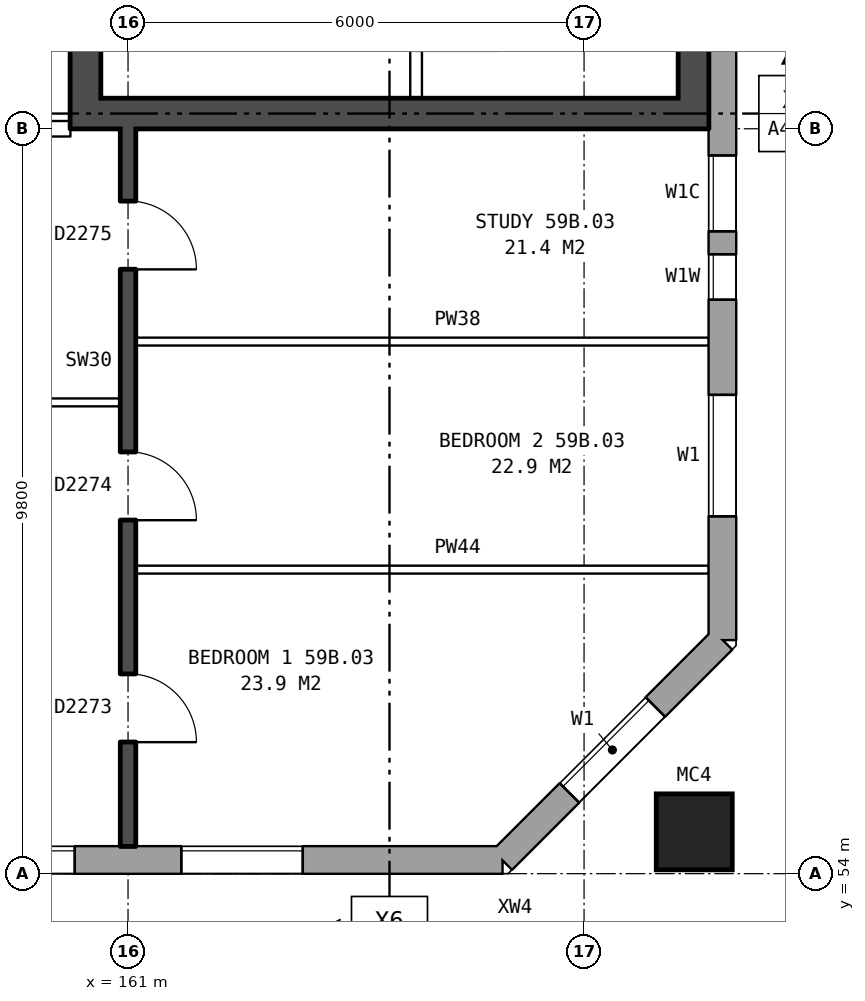
"""IFC4 building model, lengths in metres.
Left out: names, types, materials, properties, quantities, classifications, styles, units other than length and angle.
Written with IfcOpenShell. Run it as: python <this file> out.ifc"""

import sys

from ifc_helpers import new_model, si_unit, direction, frame, frame_2d, origin, origin_2d, place, context, subcontext, project, spatial, rectangle, hollow_rectangle, extrude, element, fill, save


model = new_model("IFC4")
c1 = context("Model", 3, precision=1e-05, world=origin(), true_north=direction((0.0, 1.0)))
c2 = subcontext(c1, "Body", "Model", "MODEL_VIEW")
j1 = project(units=[si_unit("LENGTHUNIT", "METRE"), si_unit("PLANEANGLEUNIT", "RADIAN")], contexts=[c1])
p1 = place(None, origin())
s1 = spatial("IfcSite", under=j1, at=p1, CompositionType="ELEMENT")
p2 = place(p1, origin())
s2 = spatial("IfcBuilding", under=s1, at=p2, CompositionType="ELEMENT")
p3 = place(p2, frame((0.0, 0.0, 209.0)))
s3 = spatial("IfcBuildingStorey", under=s2, at=p3, CompositionType="ELEMENT", Elevation=209.0)
p4 = place(p3, frame((168.45, 54.55, 0.0), z_axis=(0.0, 0.0, 1.0), x_axis=(1.0, 0.0, 0.0)))
e1 = element("IfcColumn", 1, at=p4, inside=s3, PredefinedType="COLUMN", context=c2, shape_type="SweptSolid", body=[
    extrude(hollow_rectangle(XDim=1.0, YDim=1.0, WallThickness=0.055, at=origin_2d()), origin(), (0.0, 0.0, 1.0), 3.1),
])
p5 = place(p3, frame((132.05, 54.18, 0.0), z_axis=(0.0, 0.0, 1.0), x_axis=(1.0, 0.0, 0.0)))
e2 = element("IfcWall", 2, at=p5, inside=s3, PredefinedType="STANDARD", context=c2, shape_type="SweptSolid", body=[
    extrude(rectangle(XDim=33.875, YDim=0.36, at=frame_2d((16.938, 0.0))), origin(), (0.0, 0.0, 1.0), 2.85),
])
p6 = place(p5, frame((0.3, 0.0, 0.8)))
e3 = element("IfcOpeningElement", 3, at=p6, cuts=e2, PredefinedType="OPENING", context=c2, shape_type="SweptSolid", body=[
    extrude(rectangle(XDim=1.4, YDim=1.8, at=frame_2d((0.7, 0.9))), frame((0.0, 0.19, 0.0), z_axis=(0.0, -1.0, 0.0), x_axis=(1.0, 0.0, 0.0)), (0.0, 0.0, 1.0), 0.38),
])
p7 = place(p5, frame((5.65, 0.0, 0.8)))
e4 = element("IfcOpeningElement", 4, at=p7, cuts=e2, PredefinedType="OPENING", context=c2, shape_type="SweptSolid", body=[
    extrude(rectangle(XDim=1.6, YDim=1.8, at=frame_2d((0.8, 0.9))), frame((0.0, 0.19, 0.0), z_axis=(0.0, -1.0, 0.0), x_axis=(1.0, 0.0, 0.0)), (0.0, 0.0, 1.0), 0.38),
])
p8 = place(p5, frame((8.65, 0.0, 0.8)))
e5 = element("IfcOpeningElement", 5, at=p8, cuts=e2, PredefinedType="OPENING", context=c2, shape_type="SweptSolid", body=[
    extrude(rectangle(XDim=1.6, YDim=1.8, at=frame_2d((0.8, 0.9))), frame((0.0, 0.19, 0.0), z_axis=(0.0, -1.0, 0.0), x_axis=(1.0, 0.0, 0.0)), (0.0, 0.0, 1.0), 0.38),
])
p9 = place(p5, frame((11.65, 0.0, 0.8)))
e6 = element("IfcOpeningElement", 6, at=p9, cuts=e2, PredefinedType="OPENING", context=c2, shape_type="SweptSolid", body=[
    extrude(rectangle(XDim=1.6, YDim=1.8, at=frame_2d((0.8, 0.9))), frame((0.0, 0.19, 0.0), z_axis=(0.0, -1.0, 0.0), x_axis=(1.0, 0.0, 0.0)), (0.0, 0.0, 1.0), 0.38),
])
p10 = place(p5, frame((14.65, 0.0, 0.8)))
e7 = element("IfcOpeningElement", 7, at=p10, cuts=e2, PredefinedType="OPENING", context=c2, shape_type="SweptSolid", body=[
    extrude(rectangle(XDim=1.6, YDim=1.8, at=frame_2d((0.8, 0.9))), frame((0.0, 0.19, 0.0), z_axis=(0.0, -1.0, 0.0), x_axis=(1.0, 0.0, 0.0)), (0.0, 0.0, 1.0), 0.38),
])
p11 = place(p5, frame((17.65, 0.0, 0.8)))
e8 = element("IfcOpeningElement", 8, at=p11, cuts=e2, PredefinedType="OPENING", context=c2, shape_type="SweptSolid", body=[
    extrude(rectangle(XDim=1.6, YDim=1.8, at=frame_2d((0.8, 0.9))), frame((0.0, 0.19, 0.0), z_axis=(0.0, -1.0, 0.0), x_axis=(1.0, 0.0, 0.0)), (0.0, 0.0, 1.0), 0.38),
])
p12 = place(p5, frame((20.65, 0.0, 0.8)))
e9 = element("IfcOpeningElement", 9, at=p12, cuts=e2, PredefinedType="OPENING", context=c2, shape_type="SweptSolid", body=[
    extrude(rectangle(XDim=1.6, YDim=1.8, at=frame_2d((0.8, 0.9))), frame((0.0, 0.19, 0.0), z_axis=(0.0, -1.0, 0.0), x_axis=(1.0, 0.0, 0.0)), (0.0, 0.0, 1.0), 0.38),
])
p13 = place(p5, frame((23.65, 0.0, 0.8)))
e10 = element("IfcOpeningElement", 10, at=p13, cuts=e2, PredefinedType="OPENING", context=c2, shape_type="SweptSolid", body=[
    extrude(rectangle(XDim=1.6, YDim=1.8, at=frame_2d((0.8, 0.9))), frame((0.0, 0.19, 0.0), z_axis=(0.0, -1.0, 0.0), x_axis=(1.0, 0.0, 0.0)), (0.0, 0.0, 1.0), 0.38),
])
p14 = place(p5, frame((26.65, 0.0, 0.8)))
e11 = element("IfcOpeningElement", 11, at=p14, cuts=e2, PredefinedType="OPENING", context=c2, shape_type="SweptSolid", body=[
    extrude(rectangle(XDim=1.6, YDim=1.8, at=frame_2d((0.8, 0.9))), frame((0.0, 0.19, 0.0), z_axis=(0.0, -1.0, 0.0), x_axis=(1.0, 0.0, 0.0)), (0.0, 0.0, 1.0), 0.38),
])
p15 = place(p5, frame((29.65, 0.0, 0.8)))
e12 = element("IfcOpeningElement", 12, at=p15, cuts=e2, PredefinedType="OPENING", context=c2, shape_type="SweptSolid", body=[
    extrude(rectangle(XDim=1.6, YDim=1.8, at=frame_2d((0.8, 0.9))), frame((0.0, 0.19, 0.0), z_axis=(0.0, -1.0, 0.0), x_axis=(1.0, 0.0, 0.0)), (0.0, 0.0, 1.0), 0.38),
])
p16 = place(p5, frame((2.0, 0.0, 0.9)))
e13 = element("IfcOpeningElement", 13, at=p16, cuts=e2, PredefinedType="OPENING", context=c2, shape_type="SweptSolid", body=[
    extrude(rectangle(XDim=0.8, YDim=1.5, at=frame_2d((0.4, 0.75))), frame((0.0, 0.19, 0.0), z_axis=(0.0, -1.0, 0.0), x_axis=(1.0, 0.0, 0.0)), (0.0, 0.0, 1.0), 0.38),
])
p17 = place(p3, frame((165.925, 54.18, 0.0), z_axis=(0.0, 0.0, 1.0), x_axis=(0.707106781187, 0.707106781187, 0.0)))
e14 = element("IfcWall", 14, at=p17, inside=s3, PredefinedType="STANDARD", context=c2, shape_type="SweptSolid", body=[
    extrude(rectangle(XDim=4.094, YDim=0.36, at=frame_2d((2.047, 0.0))), origin(), (0.0, 0.0, 1.0), 2.85),
])
p18 = place(p17, frame((1.247, 0.0, 0.8)))
e15 = element("IfcOpeningElement", 15, at=p18, cuts=e14, PredefinedType="OPENING", context=c2, shape_type="SweptSolid", body=[
    extrude(rectangle(XDim=1.6, YDim=1.8, at=frame_2d((0.8, 0.9))), frame((0.0, 0.19, 0.0), z_axis=(0.0, -1.0, 0.0), x_axis=(1.0, 0.0, 0.0)), (0.0, 0.0, 1.0), 0.38),
])
p19 = place(p3, frame((168.82, 57.075, 0.0), z_axis=(0.0, 0.0, 1.0), x_axis=(0.0, 1.0, 0.0)))
e16 = element("IfcWall", 16, at=p19, inside=s3, PredefinedType="STANDARD", context=c2, shape_type="SweptSolid", body=[
    extrude(rectangle(XDim=25.851, YDim=0.36, at=frame_2d((12.925, 0.0))), origin(), (0.0, 0.0, 1.0), 2.85),
])
p20 = place(p19, frame((1.625, 0.0, 0.8)))
e17 = element("IfcOpeningElement", 17, at=p20, cuts=e16, PredefinedType="OPENING", context=c2, shape_type="SweptSolid", body=[
    extrude(rectangle(XDim=1.6, YDim=1.8, at=frame_2d((0.8, 0.9))), frame((0.0, 0.19, 0.0), z_axis=(0.0, -1.0, 0.0), x_axis=(1.0, 0.0, 0.0)), (0.0, 0.0, 1.0), 0.38),
])
p21 = place(p19, frame((4.475, 0.0, 0.15)))
e18 = element("IfcOpeningElement", 18, at=p21, cuts=e16, PredefinedType="OPENING", context=c2, shape_type="SweptSolid", body=[
    extrude(rectangle(XDim=0.6, YDim=0.9, at=frame_2d((0.3, 0.45))), frame((0.0, 0.19, 0.0), z_axis=(0.0, -1.0, 0.0), x_axis=(1.0, 0.0, 0.0)), (0.0, 0.0, 1.0), 0.38),
])
p22 = place(p19, frame((19.425, 0.0, 0.25)))
e19 = element("IfcOpeningElement", 19, at=p22, cuts=e16, PredefinedType="OPENING", context=c2, shape_type="SweptSolid", body=[
    extrude(rectangle(XDim=1.0, YDim=1.8, at=frame_2d((0.5, 0.9))), frame((0.0, 0.19, 0.0), z_axis=(0.0, -1.0, 0.0), x_axis=(1.0, 0.0, 0.0)), (0.0, 0.0, 1.0), 0.38),
])
p23 = place(p19, frame((22.625, 0.0, 0.8)))
e20 = element("IfcOpeningElement", 20, at=p23, cuts=e16, PredefinedType="OPENING", context=c2, shape_type="SweptSolid", body=[
    extrude(rectangle(XDim=1.6, YDim=1.8, at=frame_2d((0.8, 0.9))), frame((0.0, 0.19, 0.0), z_axis=(0.0, -1.0, 0.0), x_axis=(1.0, 0.0, 0.0)), (0.0, 0.0, 1.0), 0.38),
])
p24 = place(p19, frame((5.375, 0.0, 0.15)))
e21 = element("IfcOpeningElement", 21, at=p24, cuts=e16, PredefinedType="OPENING", context=c2, shape_type="SweptSolid", body=[
    extrude(rectangle(XDim=1.0, YDim=1.8, at=frame_2d((0.5, 0.9))), frame((0.0, 0.19, 0.0), z_axis=(0.0, -1.0, 0.0), x_axis=(1.0, 0.0, 0.0)), (0.0, 0.0, 1.0), 0.38),
])
p25 = place(p19, frame((20.725, 0.0, 0.15)))
e22 = element("IfcOpeningElement", 22, at=p25, cuts=e16, PredefinedType="OPENING", context=c2, shape_type="SweptSolid", body=[
    extrude(rectangle(XDim=0.6, YDim=0.9, at=frame_2d((0.3, 0.45))), frame((0.0, 0.19, 0.0), z_axis=(0.0, -1.0, 0.0), x_axis=(1.0, 0.0, 0.0)), (0.0, 0.0, 1.0), 0.38),
])
p26 = place(p3, frame((160.44, 76.2, 0.0), z_axis=(0.0, 0.0, 1.0), x_axis=(0.0, -1.0, 0.0)))
e23 = element("IfcWall", 23, at=p26, inside=s3, PredefinedType="SHEAR", context=c2, shape_type="SweptSolid", body=[
    extrude(rectangle(XDim=12.4, YDim=0.4, at=frame_2d((6.2, 0.0))), origin(), (0.0, 0.0, 1.0), 2.85),
])
p27 = place(p26, frame((1.325, 0.0, 0.0)))
e24 = element("IfcOpeningElement", 24, at=p27, cuts=e23, PredefinedType="OPENING", context=c2, shape_type="SweptSolid", body=[
    extrude(rectangle(XDim=1.1, YDim=2.1, at=frame_2d((0.55, 1.05))), frame((0.0, 0.21, 0.0), z_axis=(0.0, -1.0, 0.0), x_axis=(1.0, 0.0, 0.0)), (0.0, 0.0, 1.0), 0.42),
])
p28 = place(p26, frame((3.825, 0.0, 0.0)))
e25 = element("IfcOpeningElement", 25, at=p28, cuts=e23, PredefinedType="OPENING", context=c2, shape_type="SweptSolid", body=[
    extrude(rectangle(XDim=0.85, YDim=2.1, at=frame_2d((0.425, 1.05))), frame((0.0, 0.21, 0.0), z_axis=(0.0, -1.0, 0.0), x_axis=(1.0, 0.0, 0.0)), (0.0, 0.0, 1.0), 0.42),
])
p29 = place(p26, frame((5.975, 0.0, 0.0)))
e26 = element("IfcOpeningElement", 26, at=p29, cuts=e23, PredefinedType="OPENING", context=c2, shape_type="SweptSolid", body=[
    extrude(rectangle(XDim=0.85, YDim=2.1, at=frame_2d((0.425, 1.05))), frame((0.0, 0.21, 0.0), z_axis=(0.0, -1.0, 0.0), x_axis=(1.0, 0.0, 0.0)), (0.0, 0.0, 1.0), 0.42),
])
p30 = place(p26, frame((9.9, 0.0, 0.0)))
e27 = element("IfcOpeningElement", 27, at=p30, cuts=e23, PredefinedType="OPENING", context=c2, shape_type="SweptSolid", body=[
    extrude(rectangle(XDim=1.1, YDim=2.1, at=frame_2d((0.55, 1.05))), frame((0.0, 0.21, 0.0), z_axis=(0.0, -1.0, 0.0), x_axis=(1.0, 0.0, 0.0)), (0.0, 0.0, 1.0), 0.42),
])
p31 = place(p26, frame((8.125, 0.0, 0.0)))
e28 = element("IfcOpeningElement", 28, at=p31, cuts=e23, PredefinedType="OPENING", context=c2, shape_type="SweptSolid", body=[
    extrude(rectangle(XDim=0.85, YDim=2.1, at=frame_2d((0.425, 1.05))), frame((0.0, 0.21, 0.0), z_axis=(0.0, -1.0, 0.0), x_axis=(1.0, 0.0, 0.0)), (0.0, 0.0, 1.0), 0.42),
])
p32 = place(p3, frame((168.44, 76.2, 0.0), z_axis=(0.0, 0.0, 1.0), x_axis=(0.0, -1.0, 0.0)))
e29 = element("IfcWall", 29, at=p32, inside=s3, PredefinedType="SHEAR", context=c2, shape_type="SweptSolid", body=[
    extrude(rectangle(XDim=12.4, YDim=0.4, at=frame_2d((6.2, 0.0))), origin(), (0.0, 0.0, 1.0), 2.85),
])
p33 = place(p3, frame((160.64, 64.0, 0.0), z_axis=(0.0, 0.0, 1.0), x_axis=(1.0, 0.0, 0.0)))
e30 = element("IfcWall", 30, at=p33, inside=s3, PredefinedType="SHEAR", context=c2, shape_type="SweptSolid", body=[
    extrude(rectangle(XDim=7.6, YDim=0.4, at=frame_2d((3.8, 0.0))), origin(), (0.0, 0.0, 1.0), 2.85),
])
p34 = place(p3, frame((164.79, 68.625, 0.0), z_axis=(0.0, 0.0, 1.0), x_axis=(0.0, -1.0, 0.0)))
e31 = element("IfcWall", 31, at=p34, inside=s3, PredefinedType="PARTITIONING", context=c2, shape_type="SweptSolid", body=[
    extrude(rectangle(XDim=4.425, YDim=0.15, at=frame_2d((2.212, 0.0))), origin(), (0.0, 0.0, 1.0), 2.85),
])
p35 = place(p34, frame((2.7, 0.0, 0.0)))
e32 = element("IfcOpeningElement", 32, at=p35, cuts=e31, PredefinedType="OPENING", context=c2, shape_type="SweptSolid", body=[
    extrude(rectangle(XDim=1.1, YDim=2.1, at=frame_2d((0.55, 1.05))), frame((0.0, 0.085, 0.0), z_axis=(0.0, -1.0, 0.0), x_axis=(1.0, 0.0, 0.0)), (0.0, 0.0, 1.0), 0.17),
])
p36 = place(p3, frame((161.1, 58.0, 0.0), z_axis=(0.0, 0.0, 1.0), x_axis=(1.0, 0.0, 0.0)))
e33 = element("IfcWall", 33, at=p36, inside=s3, PredefinedType="PARTITIONING", context=c2, shape_type="SweptSolid", body=[
    extrude(rectangle(XDim=7.54, YDim=0.1, at=frame_2d((3.77, 0.0))), origin(), (0.0, 0.0, 1.0), 2.85),
])
p37 = place(p3, frame((155.1, 60.2, 0.0), z_axis=(0.0, 0.0, 1.0), x_axis=(1.0, 0.0, 0.0)))
e34 = element("IfcWall", 34, at=p37, inside=s3, PredefinedType="PARTITIONING", context=c2, shape_type="SweptSolid", body=[
    extrude(rectangle(XDim=5.8, YDim=0.1, at=frame_2d((2.9, 0.0))), origin(), (0.0, 0.0, 1.0), 2.85),
])
p38 = place(p37, frame((3.6, 0.0, 0.0)))
e35 = element("IfcOpeningElement", 35, at=p38, cuts=e34, PredefinedType="OPENING", context=c2, shape_type="SweptSolid", body=[
    extrude(rectangle(XDim=0.9, YDim=2.1, at=frame_2d((0.45, 1.05))), frame((0.0, 0.06, 0.0), z_axis=(0.0, -1.0, 0.0), x_axis=(1.0, 0.0, 0.0)), (0.0, 0.0, 1.0), 0.12),
])
p39 = place(p37, frame((0.7, 0.0, 0.0)))
e36 = element("IfcOpeningElement", 36, at=p39, cuts=e34, PredefinedType="OPENING", context=c2, shape_type="SweptSolid", body=[
    extrude(rectangle(XDim=0.9, YDim=2.1, at=frame_2d((0.45, 1.05))), frame((0.0, 0.06, 0.0), z_axis=(0.0, -1.0, 0.0), x_axis=(1.0, 0.0, 0.0)), (0.0, 0.0, 1.0), 0.12),
])
p40 = place(p3, frame((161.1, 61.0, 0.0), z_axis=(0.0, 0.0, 1.0), x_axis=(1.0, 0.0, 0.0)))
e37 = element("IfcWall", 37, at=p40, inside=s3, PredefinedType="PARTITIONING", context=c2, shape_type="SweptSolid", body=[
    extrude(rectangle(XDim=7.54, YDim=0.1, at=frame_2d((3.77, 0.0))), origin(), (0.0, 0.0, 1.0), 2.85),
])
p41 = place(p3, frame((157.24, 63.8, 0.0), z_axis=(0.0, 0.0, 1.0), x_axis=(1.0, 0.0, 0.0)))
e38 = element("IfcWall", 38, at=p41, inside=s3, PredefinedType="PARTITIONING", context=c2, shape_type="SweptSolid", body=[
    extrude(rectangle(XDim=3.0, YDim=0.2, at=frame_2d((1.5, 0.0))), origin(), (0.0, 0.0, 1.0), 2.85),
])
p42 = place(p41, frame((1.0, 0.0, 0.0)))
e39 = element("IfcOpeningElement", 39, at=p42, cuts=e38, PredefinedType="OPENING", context=c2, shape_type="SweptSolid", body=[
    extrude(rectangle(XDim=1.0, YDim=2.1, at=frame_2d((0.5, 1.05))), frame((0.0, 0.11, 0.0), z_axis=(0.0, -1.0, 0.0), x_axis=(1.0, 0.0, 0.0)), (0.0, 0.0, 1.0), 0.22),
])
p43 = place(p3, frame((161.0, 54.36, 0.0), z_axis=(0.0, 0.0, 1.0), x_axis=(0.0, 1.0, 0.0)))
e40 = element("IfcWall", 40, at=p43, inside=s3, PredefinedType="SOLIDWALL", context=c2, shape_type="SweptSolid", body=[
    extrude(rectangle(XDim=9.44, YDim=0.2, at=frame_2d((4.72, 0.0))), origin(), (0.0, 0.0, 1.0), 2.85),
])
p44 = place(p43, frame((1.37, 0.0, 0.0)))
e41 = element("IfcOpeningElement", 41, at=p44, cuts=e40, PredefinedType="OPENING", context=c2, shape_type="SweptSolid", body=[
    extrude(rectangle(XDim=0.9, YDim=2.1, at=frame_2d((0.45, 1.05))), frame((0.0, 0.11, 0.0), z_axis=(0.0, -1.0, 0.0), x_axis=(1.0, 0.0, 0.0)), (0.0, 0.0, 1.0), 0.22),
])
p45 = place(p43, frame((4.29, 0.0, 0.0)))
e42 = element("IfcOpeningElement", 42, at=p45, cuts=e40, PredefinedType="OPENING", context=c2, shape_type="SweptSolid", body=[
    extrude(rectangle(XDim=0.9, YDim=2.1, at=frame_2d((0.45, 1.05))), frame((0.0, 0.11, 0.0), z_axis=(0.0, -1.0, 0.0), x_axis=(1.0, 0.0, 0.0)), (0.0, 0.0, 1.0), 0.22),
])
p46 = place(p43, frame((7.59, 0.0, 0.0)))
e43 = element("IfcOpeningElement", 43, at=p46, cuts=e40, PredefinedType="OPENING", context=c2, shape_type="SweptSolid", body=[
    extrude(rectangle(XDim=0.9, YDim=2.1, at=frame_2d((0.45, 1.05))), frame((0.0, 0.11, 0.0), z_axis=(0.0, -1.0, 0.0), x_axis=(1.0, 0.0, 0.0)), (0.0, 0.0, 1.0), 0.22),
])
p47 = place(p14, origin())
e44 = element("IfcWindow", 44, at=p47, inside=s3, PartitioningType="SINGLE_PANEL", PredefinedType="WINDOW", context=c2, shape_type="SweptSolid", body=[
    extrude(rectangle(XDim=1.6, YDim=1.8, at=frame_2d((0.8, 0.9))), frame((0.0, 0.15, 0.0), z_axis=(0.0, -1.0, 0.0), x_axis=(1.0, 0.0, 0.0)), (0.0, 0.0, 1.0), 0.06),
])
fill(e11, e44)
p48 = place(p15, origin())
e45 = element("IfcWindow", 45, at=p48, inside=s3, PartitioningType="SINGLE_PANEL", PredefinedType="WINDOW", context=c2, shape_type="SweptSolid", body=[
    extrude(rectangle(XDim=1.6, YDim=1.8, at=frame_2d((0.8, 0.9))), frame((0.0, 0.15, 0.0), z_axis=(0.0, -1.0, 0.0), x_axis=(1.0, 0.0, 0.0)), (0.0, 0.0, 1.0), 0.06),
])
fill(e12, e45)
p49 = place(p18, origin())
e46 = element("IfcWindow", 46, at=p49, inside=s3, PartitioningType="SINGLE_PANEL", PredefinedType="WINDOW", context=c2, shape_type="SweptSolid", body=[
    extrude(rectangle(XDim=1.6, YDim=1.8, at=frame_2d((0.8, 0.9))), frame((0.0, 0.15, 0.0), z_axis=(0.0, -1.0, 0.0), x_axis=(1.0, 0.0, 0.0)), (0.0, 0.0, 1.0), 0.06),
])
fill(e15, e46)
p50 = place(p20, origin())
e47 = element("IfcWindow", 47, at=p50, inside=s3, PartitioningType="SINGLE_PANEL", PredefinedType="WINDOW", context=c2, shape_type="SweptSolid", body=[
    extrude(rectangle(XDim=1.6, YDim=1.8, at=frame_2d((0.8, 0.9))), frame((0.0, 0.15, 0.0), z_axis=(0.0, -1.0, 0.0), x_axis=(1.0, 0.0, 0.0)), (0.0, 0.0, 1.0), 0.06),
])
fill(e17, e47)
p51 = place(p21, origin())
e48 = element("IfcWindow", 48, at=p51, inside=s3, PartitioningType="SINGLE_PANEL", PredefinedType="WINDOW", context=c2, shape_type="SweptSolid", body=[
    extrude(rectangle(XDim=0.6, YDim=0.9, at=frame_2d((0.3, 0.45))), frame((0.0, 0.15, 0.0), z_axis=(0.0, -1.0, 0.0), x_axis=(1.0, 0.0, 0.0)), (0.0, 0.0, 1.0), 0.06),
])
fill(e18, e48)
p52 = place(p44, frame((0.9, 0.0, 0.0), z_axis=(0.0, 0.0, 1.0), x_axis=(-1.0, 0.0, 0.0)))
e49 = element("IfcDoor", 49, at=p52, inside=s3, OperationType="SINGLE_SWING_RIGHT", PredefinedType="DOOR", context=c2, shape_type="SweptSolid", body=[
    extrude(rectangle(XDim=0.9, YDim=2.1, at=frame_2d((0.45, 1.05))), frame((0.0, 0.025, 0.0), z_axis=(0.0, -1.0, 0.0), x_axis=(1.0, 0.0, 0.0)), (0.0, 0.0, 1.0), 0.05),
])
fill(e41, e49)
p53 = place(p45, frame((0.9, 0.0, 0.0), z_axis=(0.0, 0.0, 1.0), x_axis=(-1.0, 0.0, 0.0)))
e50 = element("IfcDoor", 50, at=p53, inside=s3, OperationType="SINGLE_SWING_RIGHT", PredefinedType="DOOR", context=c2, shape_type="SweptSolid", body=[
    extrude(rectangle(XDim=0.9, YDim=2.1, at=frame_2d((0.45, 1.05))), frame((0.0, 0.025, 0.0), z_axis=(0.0, -1.0, 0.0), x_axis=(1.0, 0.0, 0.0)), (0.0, 0.0, 1.0), 0.05),
])
fill(e42, e50)
p54 = place(p46, frame((0.9, 0.0, 0.0), z_axis=(0.0, 0.0, 1.0), x_axis=(-1.0, 0.0, 0.0)))
e51 = element("IfcDoor", 51, at=p54, inside=s3, OperationType="SINGLE_SWING_RIGHT", PredefinedType="DOOR", context=c2, shape_type="SweptSolid", body=[
    extrude(rectangle(XDim=0.9, YDim=2.1, at=frame_2d((0.45, 1.05))), frame((0.0, 0.025, 0.0), z_axis=(0.0, -1.0, 0.0), x_axis=(1.0, 0.0, 0.0)), (0.0, 0.0, 1.0), 0.05),
])
fill(e43, e51)
p55 = place(p24, origin())
e52 = element("IfcWindow", 52, at=p55, inside=s3, PartitioningType="SINGLE_PANEL", PredefinedType="WINDOW", context=c2, shape_type="SweptSolid", body=[
    extrude(rectangle(XDim=1.0, YDim=1.8, at=frame_2d((0.5, 0.9))), frame((0.0, 0.15, 0.0), z_axis=(0.0, -1.0, 0.0), x_axis=(1.0, 0.0, 0.0)), (0.0, 0.0, 1.0), 0.06),
])
fill(e21, e52)
save(model, sys.argv[1])
